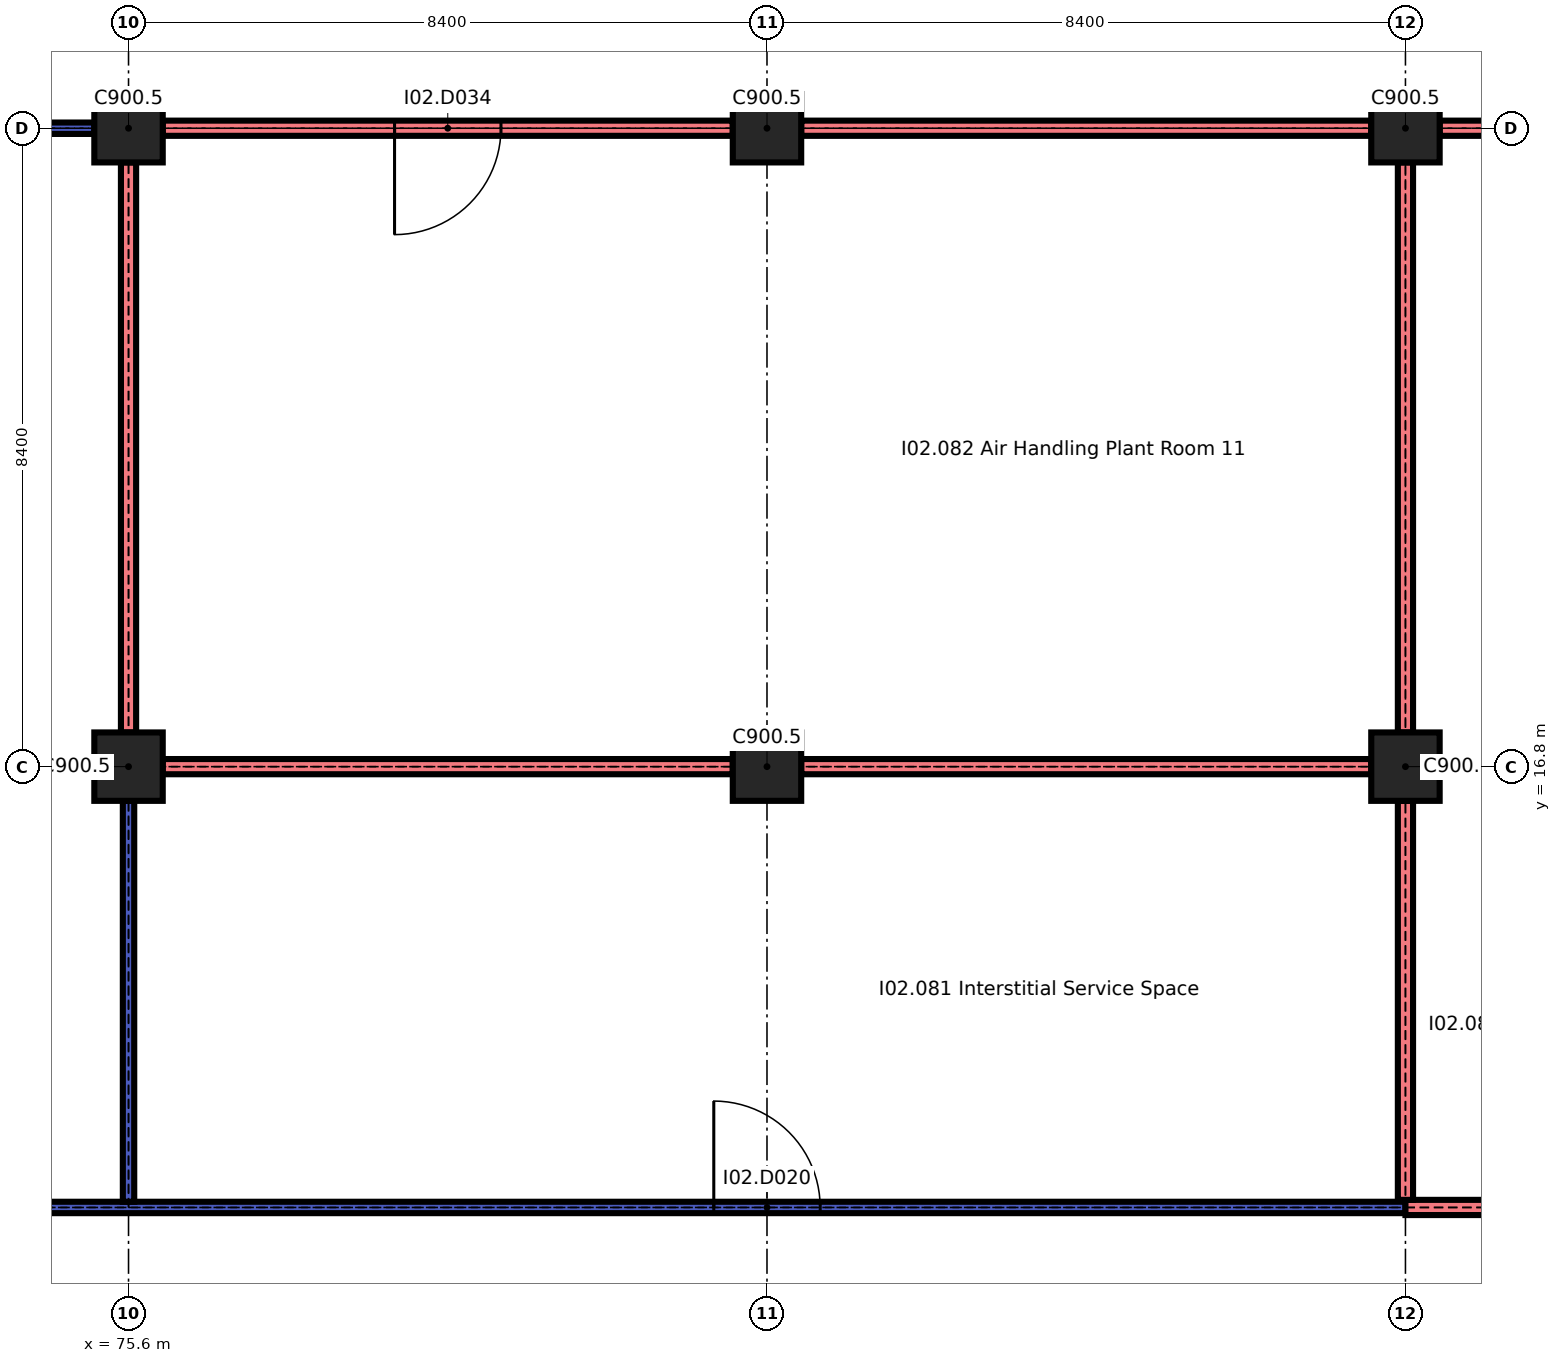
"""IFC4 building model, lengths in metres.
Left out: names, types, materials, properties, quantities, classifications, styles, units other than length and angle.
Written with IfcOpenShell. Run it as: python <this file> out.ifc"""

import sys

from ifc_helpers import new_model, si_unit, direction, frame, frame_2d, origin, origin_2d, place, context, subcontext, project, spatial, rectangle, extrude, element, fill, save


model = new_model("IFC4")
c1 = context("Model", 3, precision=1e-05, world=origin(), true_north=direction((0.0, 1.0)))
c2 = subcontext(c1, "Body", "Model", "MODEL_VIEW")
j1 = project(units=[si_unit("LENGTHUNIT", "METRE"), si_unit("PLANEANGLEUNIT", "RADIAN")], contexts=[c1])
p1 = place(None, origin())
s1 = spatial("IfcSite", under=j1, at=p1, CompositionType="ELEMENT")
p2 = place(p1, origin())
s2 = spatial("IfcBuilding", under=s1, at=p2, CompositionType="ELEMENT")
p3 = place(p2, frame((0.0, 0.0, 12.9)))
s3 = spatial("IfcBuildingStorey", under=s2, at=p3, CompositionType="ELEMENT", Elevation=12.9)
for number, where, z_axis, x_axis in (
    (1, (75.6, 16.8, 0.0), (0.0, 0.0, 1.0), (1.0, 0.0, 0.0)),
    (2, (84.0, 16.8, 0.0), (0.0, 0.0, 1.0), (1.0, 0.0, 0.0)),
    (3, (92.4, 16.8, 0.0), (0.0, 0.0, 1.0), (1.0, 0.0, 0.0)),
    (4, (75.6, 25.2, 0.0), (0.0, 0.0, 1.0), (1.0, 0.0, 0.0)),
    (5, (84.0, 25.2, 0.0), (0.0, 0.0, 1.0), (1.0, 0.0, 0.0)),
    (6, (92.4, 25.2, 0.0), (0.0, 0.0, 1.0), (1.0, 0.0, 0.0)),
):
    element("IfcColumn", number, at=place(p3, frame(where, z_axis=z_axis, x_axis=x_axis)), inside=s3, PredefinedType="COLUMN", context=c2, shape_type="SweptSolid", body=[
        extrude(rectangle(XDim=0.9, YDim=0.9, at=origin_2d()), origin(), (0.0, 0.0, 1.0), 2.04),
    ])
p4 = place(p3, frame((56.525, 11.0, 0.0), z_axis=(0.0, 0.0, 1.0), x_axis=(1.0, 0.0, 0.0)))
e7 = element("IfcWall", 7, at=p4, inside=s3, PredefinedType="PARTITIONING", context=c2, shape_type="SweptSolid", body=[
    extrude(rectangle(XDim=35.875, YDim=0.15, at=frame_2d((17.938, 0.0))), origin(), (0.0, 0.0, 1.0), 2.04),
])
p5 = place(p4, frame((8.875, 0.0, 0.0)))
e8 = element("IfcOpeningElement", 8, at=p5, cuts=e7, PredefinedType="OPENING", context=c2, shape_type="SweptSolid", body=[
    extrude(rectangle(XDim=1.4, YDim=2.0, at=frame_2d((0.7, 1.0))), frame((0.0, 0.085, 0.0), z_axis=(0.0, -1.0, 0.0), x_axis=(1.0, 0.0, 0.0)), (0.0, 0.0, 1.0), 0.17),
])
p6 = place(p4, frame((26.775, 0.0, 0.0)))
e9 = element("IfcOpeningElement", 9, at=p6, cuts=e7, PredefinedType="OPENING", context=c2, shape_type="SweptSolid", body=[
    extrude(rectangle(XDim=1.4, YDim=2.0, at=frame_2d((0.7, 1.0))), frame((0.0, 0.085, 0.0), z_axis=(0.0, -1.0, 0.0), x_axis=(1.0, 0.0, 0.0)), (0.0, 0.0, 1.0), 0.17),
])
p7 = place(p3, frame((92.4, 11.0, 0.0), z_axis=(0.0, 0.0, 1.0), x_axis=(1.0, 0.0, 0.0)))
e10 = element("IfcWall", 10, at=p7, inside=s3, PredefinedType="SOLIDWALL", context=c2, shape_type="SweptSolid", body=[
    extrude(rectangle(XDim=4.3, YDim=0.2, at=frame_2d((2.15, 0.0))), origin(), (0.0, 0.0, 1.0), 2.04),
])
for number, where, z_axis, x_axis in (
    (11, (76.05, 16.8, 0.0), (0.0, 0.0, 1.0), (1.0, 0.0, 0.0)),
    (12, (84.45, 16.8, 0.0), (0.0, 0.0, 1.0), (1.0, 0.0, 0.0)),
):
    element("IfcWall", number, at=place(p3, frame(where, z_axis=z_axis, x_axis=x_axis)), inside=s3, PredefinedType="SOLIDWALL", context=c2, shape_type="SweptSolid", body=[
        extrude(rectangle(XDim=7.5, YDim=0.2, at=frame_2d((3.75, 0.0))), origin(), (0.0, 0.0, 1.0), 2.04),
    ])
p8 = place(p3, frame((67.65, 25.2, 0.0), z_axis=(0.0, 0.0, 1.0), x_axis=(1.0, 0.0, 0.0)))
e13 = element("IfcWall", 13, at=p8, inside=s3, PredefinedType="PARTITIONING", context=c2, shape_type="SweptSolid", body=[
    extrude(rectangle(XDim=7.5, YDim=0.15, at=frame_2d((3.75, 0.0))), origin(), (0.0, 0.0, 1.0), 2.04),
])
p9 = place(p3, frame((76.05, 25.2, 0.0), z_axis=(0.0, 0.0, 1.0), x_axis=(1.0, 0.0, 0.0)))
e14 = element("IfcWall", 14, at=p9, inside=s3, PredefinedType="SOLIDWALL", context=c2, shape_type="SweptSolid", body=[
    extrude(rectangle(XDim=7.5, YDim=0.2, at=frame_2d((3.75, 0.0))), origin(), (0.0, 0.0, 1.0), 2.04),
])
p10 = place(p9, frame((3.05, 0.0, 0.0)))
e15 = element("IfcOpeningElement", 15, at=p10, cuts=e14, PredefinedType="OPENING", context=c2, shape_type="SweptSolid", body=[
    extrude(rectangle(XDim=1.4, YDim=2.0, at=frame_2d((0.7, 1.0))), frame((0.0, 0.11, 0.0), z_axis=(0.0, -1.0, 0.0), x_axis=(1.0, 0.0, 0.0)), (0.0, 0.0, 1.0), 0.22),
])
p11 = place(p3, frame((84.45, 25.2, 0.0), z_axis=(0.0, 0.0, 1.0), x_axis=(1.0, 0.0, 0.0)))
e16 = element("IfcWall", 16, at=p11, inside=s3, PredefinedType="SOLIDWALL", context=c2, shape_type="SweptSolid", body=[
    extrude(rectangle(XDim=7.5, YDim=0.2, at=frame_2d((3.75, 0.0))), origin(), (0.0, 0.0, 1.0), 2.04),
])
p12 = place(p3, frame((92.85, 25.2, 0.0), z_axis=(0.0, 0.0, 1.0), x_axis=(1.0, 0.0, 0.0)))
e17 = element("IfcWall", 17, at=p12, inside=s3, PredefinedType="SOLIDWALL", context=c2, shape_type="SweptSolid", body=[
    extrude(rectangle(XDim=3.85, YDim=0.2, at=frame_2d((1.925, 0.0))), origin(), (0.0, 0.0, 1.0), 2.04),
])
p13 = place(p3, frame((75.6, 11.075, 0.0), z_axis=(0.0, 0.0, 1.0), x_axis=(0.0, 1.0, 0.0)))
e18 = element("IfcWall", 18, at=p13, inside=s3, PredefinedType="PARTITIONING", context=c2, shape_type="SweptSolid", body=[
    extrude(rectangle(XDim=5.275, YDim=0.15, at=frame_2d((2.638, 0.0))), origin(), (0.0, 0.0, 1.0), 2.04),
])
p14 = place(p3, frame((75.6, 17.25, 0.0), z_axis=(0.0, 0.0, 1.0), x_axis=(0.0, 1.0, 0.0)))
e19 = element("IfcWall", 19, at=p14, inside=s3, PredefinedType="SOLIDWALL", context=c2, shape_type="SweptSolid", body=[
    extrude(rectangle(XDim=7.5, YDim=0.2, at=frame_2d((3.75, 0.0))), origin(), (0.0, 0.0, 1.0), 2.04),
])
p15 = place(p3, frame((92.4, 11.1, 0.0), z_axis=(0.0, 0.0, 1.0), x_axis=(0.0, 1.0, 0.0)))
e20 = element("IfcWall", 20, at=p15, inside=s3, PredefinedType="SOLIDWALL", context=c2, shape_type="SweptSolid", body=[
    extrude(rectangle(XDim=5.25, YDim=0.2, at=frame_2d((2.625, 0.0))), origin(), (0.0, 0.0, 1.0), 2.04),
])
p16 = place(p3, frame((92.4, 17.25, 0.0), z_axis=(0.0, 0.0, 1.0), x_axis=(0.0, 1.0, 0.0)))
e21 = element("IfcWall", 21, at=p16, inside=s3, PredefinedType="SOLIDWALL", context=c2, shape_type="SweptSolid", body=[
    extrude(rectangle(XDim=7.5, YDim=0.2, at=frame_2d((3.75, 0.0))), origin(), (0.0, 0.0, 1.0), 2.04),
])
p17 = place(p6, origin())
e22 = element("IfcDoor", 22, at=p17, inside=s3, OperationType="SINGLE_SWING_RIGHT", PredefinedType="DOOR", context=c2, shape_type="SweptSolid", body=[
    extrude(rectangle(XDim=1.4, YDim=2.0, at=frame_2d((0.7, 1.0))), frame((0.0, 0.025, 0.0), z_axis=(0.0, -1.0, 0.0), x_axis=(1.0, 0.0, 0.0)), (0.0, 0.0, 1.0), 0.05),
])
fill(e9, e22)
p18 = place(p10, origin())
e23 = element("IfcDoor", 23, at=p18, inside=s3, OperationType="SINGLE_SWING_LEFT", PredefinedType="DOOR", context=c2, shape_type="SweptSolid", body=[
    extrude(rectangle(XDim=1.4, YDim=2.0, at=frame_2d((0.7, 1.0))), frame((0.0, 0.025, 0.0), z_axis=(0.0, -1.0, 0.0), x_axis=(1.0, 0.0, 0.0)), (0.0, 0.0, 1.0), 0.05),
])
fill(e15, e23)
save(model, sys.argv[1])
